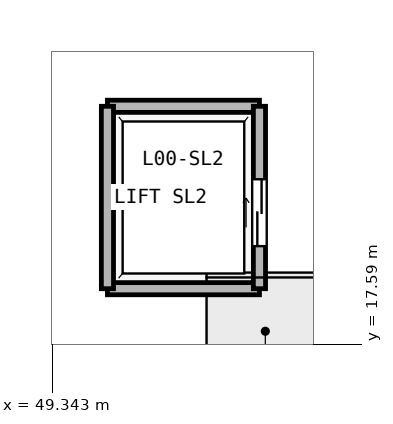
"""IFC4 building model, lengths in metres.
Left out: names, types, materials, properties, quantities, classifications, styles, units other than length and angle.
Written with IfcOpenShell. Run it as: python <this file> out.ifc"""

import sys

from ifc_helpers import new_model, si_unit, direction, frame, frame_2d, origin, place, context, subcontext, project, spatial, rectangle, extrude, element, fill, save


model = new_model("IFC4")
c1 = context("Model", 3, precision=1e-05, world=origin(), true_north=direction((0.0, 1.0)))
c2 = subcontext(c1, "Body", "Model", "MODEL_VIEW")
j1 = project(units=[si_unit("LENGTHUNIT", "METRE"), si_unit("PLANEANGLEUNIT", "RADIAN")], contexts=[c1])
p1 = place(None, origin())
s1 = spatial("IfcSite", under=j1, at=p1, CompositionType="ELEMENT")
p2 = place(p1, origin())
s2 = spatial("IfcBuilding", under=s1, at=p2, CompositionType="ELEMENT")
p3 = place(p2, origin())
s3 = spatial("IfcBuildingStorey", under=s2, at=p3, CompositionType="ELEMENT", Elevation=0.0)
for number, where, z_axis, x_axis in (
    (1, (50.25, 18.5, 0.0), (0.0, 0.0, 1.0), (1.0, 0.0, 0.0)),
    (2, (50.25, 21.5, 0.0), (0.0, 0.0, 1.0), (1.0, 0.0, 0.0)),
):
    element("IfcWall", number, at=place(p3, frame(where, z_axis=z_axis, x_axis=x_axis)), inside=s3, PredefinedType="PARTITIONING", context=c2, shape_type="SweptSolid", body=[
        extrude(rectangle(XDim=2.5, YDim=0.2, at=frame_2d((1.25, 0.0))), origin(), (0.0, 0.0, 1.0), 4.18),
    ])
p4 = place(p3, frame((50.25, 18.5, 0.0), z_axis=(0.0, 0.0, 1.0), x_axis=(0.0, 1.0, 0.0)))
e3 = element("IfcWall", 3, at=p4, inside=s3, PredefinedType="PARTITIONING", context=c2, shape_type="SweptSolid", body=[
    extrude(rectangle(XDim=3.0, YDim=0.2, at=frame_2d((1.5, 0.0))), origin(), (0.0, 0.0, 1.0), 4.18),
])
p5 = place(p3, frame((52.75, 18.5, 0.0), z_axis=(0.0, 0.0, 1.0), x_axis=(0.0, 1.0, 0.0)))
e4 = element("IfcWall", 4, at=p5, inside=s3, PredefinedType="PARTITIONING", context=c2, shape_type="SweptSolid", body=[
    extrude(rectangle(XDim=3.0, YDim=0.2, at=frame_2d((1.5, 0.0))), origin(), (0.0, 0.0, 1.0), 4.18),
])
p6 = place(p5, frame((0.7, 0.0, 0.0)))
e5 = element("IfcOpeningElement", 5, at=p6, cuts=e4, PredefinedType="OPENING", context=c2, shape_type="SweptSolid", body=[
    extrude(rectangle(XDim=1.1, YDim=2.25, at=frame_2d((0.55, 1.125))), frame((0.0, 0.11, 0.0), z_axis=(0.0, -1.0, 0.0), x_axis=(1.0, 0.0, 0.0)), (0.0, 0.0, 1.0), 0.22),
])
p7 = place(p6, origin())
e6 = element("IfcDoor", 6, at=p7, inside=s3, OperationType="DOUBLE_DOOR_SLIDING", PredefinedType="DOOR", context=c2, shape_type="SweptSolid", body=[
    extrude(rectangle(XDim=1.1, YDim=2.25, at=frame_2d((0.55, 1.125))), frame((0.0, 0.025, 0.0), z_axis=(0.0, -1.0, 0.0), x_axis=(1.0, 0.0, 0.0)), (0.0, 0.0, 1.0), 0.05),
])
fill(e5, e6)
save(model, sys.argv[1])
